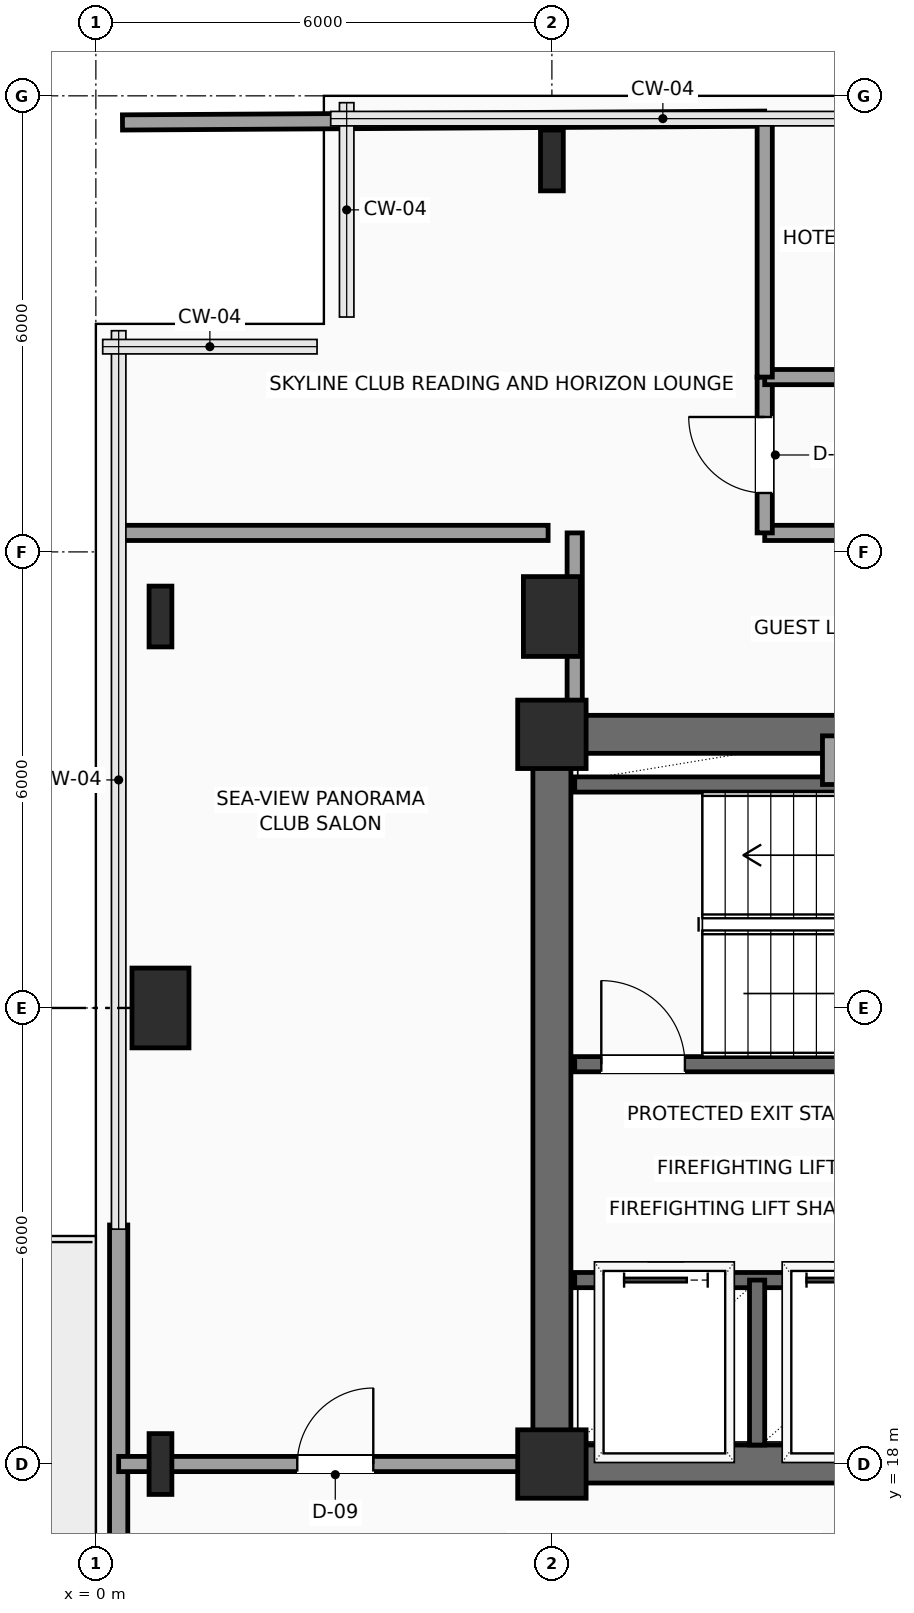
"""IFC4 building model, lengths in metres.
Left out: names, types, materials, properties, quantities, classifications, styles, units other than length and angle.
Written with IfcOpenShell. Run it as: python <this file> out.ifc"""

import sys

from ifc_helpers import new_model, si_unit, direction, frame, frame_2d, origin, origin_2d, place, context, subcontext, project, spatial, rectangle, i_section, extrude, element, fill, save


model = new_model("IFC4")
c1 = context("Model", 3, precision=1e-05, world=origin(), true_north=direction((0.0, 1.0)))
c2 = subcontext(c1, "Body", "Model", "MODEL_VIEW")
j1 = project(units=[si_unit("LENGTHUNIT", "METRE"), si_unit("PLANEANGLEUNIT", "RADIAN")], contexts=[c1])
p1 = place(None, origin())
s1 = spatial("IfcSite", under=j1, at=p1, CompositionType="ELEMENT")
p2 = place(p1, origin())
s2 = spatial("IfcBuilding", under=s1, at=p2, CompositionType="ELEMENT")
p3 = place(p2, frame((0.0, 0.0, 176.7)))
s3 = spatial("IfcBuildingStorey", under=s2, at=p3, CompositionType="ELEMENT", Elevation=176.7)
for number, where, z_axis, x_axis in (
    (1, (6.0, 18.0, 0.0), (0.0, 0.0, 1.0), (1.0, 0.0, 0.0)),
    (2, (6.0, 27.6, 0.0), (0.0, 0.0, 1.0), (1.0, 0.0, 0.0)),
):
    element("IfcColumn", number, at=place(p3, frame(where, z_axis=z_axis, x_axis=x_axis)), inside=s3, PredefinedType="COLUMN", context=c2, shape_type="SweptSolid", body=[
        extrude(rectangle(XDim=0.9, YDim=0.9, at=origin_2d()), origin(), (0.0, 0.0, 1.0), 3.75),
    ])
p4 = place(p3, frame((0.85, 18.0, 0.0), z_axis=(0.0, 0.0, 1.0), x_axis=(1.0, 0.0, 0.0)))
e3 = element("IfcColumn", 3, at=p4, inside=s3, PredefinedType="COLUMN", context=c2, shape_type="SweptSolid", body=[
    extrude(i_section(OverallWidth=0.3, OverallDepth=0.8, WebThickness=0.018, FlangeThickness=0.033, FilletRadius=0.03, at=origin_2d()), origin(), (0.0, 0.0, 1.0), 3.75),
])
p5 = place(p3, frame((0.85, 24.0, 0.0), z_axis=(0.0, 0.0, 1.0), x_axis=(1.0, 0.0, 0.0)))
e4 = element("IfcColumn", 4, at=p5, inside=s3, PredefinedType="COLUMN", context=c2, shape_type="SweptSolid", body=[
    extrude(rectangle(XDim=0.75, YDim=1.05, at=origin_2d()), origin(), (0.0, 0.0, 1.0), 3.75),
])
p6 = place(p3, frame((0.85, 29.15, 0.0), z_axis=(0.0, 0.0, 1.0), x_axis=(1.0, 0.0, 0.0)))
e5 = element("IfcColumn", 5, at=p6, inside=s3, PredefinedType="COLUMN", context=c2, shape_type="SweptSolid", body=[
    extrude(i_section(OverallWidth=0.3, OverallDepth=0.8, WebThickness=0.018, FlangeThickness=0.033, FilletRadius=0.03, at=origin_2d()), origin(), (0.0, 0.0, 1.0), 3.75),
])
p7 = place(p3, frame((6.0, 29.15, 0.0), z_axis=(0.0, 0.0, 1.0), x_axis=(1.0, 0.0, 0.0)))
e6 = element("IfcColumn", 6, at=p7, inside=s3, PredefinedType="COLUMN", context=c2, shape_type="SweptSolid", body=[
    extrude(rectangle(XDim=0.75, YDim=1.05, at=origin_2d()), origin(), (0.0, 0.0, 1.0), 3.75),
])
p8 = place(p3, frame((6.0, 35.15, 0.0), z_axis=(0.0, 0.0, 1.0), x_axis=(1.0, 0.0, 0.0)))
e7 = element("IfcColumn", 7, at=p8, inside=s3, PredefinedType="COLUMN", context=c2, shape_type="SweptSolid", body=[
    extrude(i_section(OverallWidth=0.3, OverallDepth=0.8, WebThickness=0.018, FlangeThickness=0.033, FilletRadius=0.03, at=origin_2d()), origin(), (0.0, 0.0, 1.0), 3.75),
])
p9 = place(p3, frame((0.3, 11.855, 0.0), z_axis=(0.0, 0.0, 1.0), x_axis=(0.0, 1.0, 0.0)))
e8 = element("IfcWall", 8, at=p9, inside=s3, PredefinedType="SOLIDWALL", context=c2, shape_type="SweptSolid", body=[
    extrude(rectangle(XDim=9.29, YDim=0.24, at=frame_2d((4.645, 0.0))), origin(), (0.0, 0.0, 1.0), 3.54),
])
p10 = place(p9, frame((2.7, 0.0, 0.0)))
e9 = element("IfcOpeningElement", 9, at=p10, cuts=e8, PredefinedType="OPENING", context=c2, shape_type="SweptSolid", body=[
    extrude(rectangle(XDim=1.05, YDim=2.2, at=frame_2d((0.525, 1.1))), frame((0.0, 0.13, 0.0), z_axis=(0.0, -1.0, 0.0), x_axis=(1.0, 0.0, 0.0)), (0.0, 0.0, 1.0), 0.26),
])
p11 = place(p3, frame((6.0, 18.0, 0.0), z_axis=(0.0, 0.0, 1.0), x_axis=(1.0, 0.0, 0.0)))
e10 = element("IfcWall", 10, at=p11, inside=s3, PredefinedType="SHEAR", context=c2, shape_type="SweptSolid", body=[
    extrude(rectangle(XDim=12.0, YDim=0.5, at=frame_2d((6.0, 0.0))), origin(), (0.0, 0.0, 1.0), 3.54),
])
p12 = place(p11, frame((7.15, 0.0, 0.0)))
e11 = element("IfcOpeningElement", 11, at=p12, cuts=e10, PredefinedType="OPENING", context=c2, shape_type="SweptSolid", body=[
    extrude(rectangle(XDim=1.6, YDim=2.3, at=frame_2d((0.8, 1.15))), frame((0.0, 0.26, 0.0), z_axis=(0.0, -1.0, 0.0), x_axis=(1.0, 0.0, 0.0)), (0.0, 0.0, 1.0), 0.52),
])
p13 = place(p3, frame((6.0, 27.6, 0.0), z_axis=(0.0, 0.0, 1.0), x_axis=(1.0, 0.0, 0.0)))
e12 = element("IfcWall", 12, at=p13, inside=s3, PredefinedType="SHEAR", context=c2, shape_type="SweptSolid", body=[
    extrude(rectangle(XDim=12.0, YDim=0.5, at=frame_2d((6.0, 0.0))), origin(), (0.0, 0.0, 1.0), 3.54),
])
p14 = place(p13, frame((10.2, 0.0, 0.0)))
e13 = element("IfcOpeningElement", 13, at=p14, cuts=e12, PredefinedType="OPENING", context=c2, shape_type="SweptSolid", body=[
    extrude(rectangle(XDim=0.9, YDim=2.15, at=frame_2d((0.45, 1.075))), frame((0.0, 0.26, 0.0), z_axis=(0.0, -1.0, 0.0), x_axis=(1.0, 0.0, 0.0)), (0.0, 0.0, 1.0), 0.52),
])
p15 = place(p3, frame((6.0, 18.0, 0.0), z_axis=(0.0, 0.0, 1.0), x_axis=(0.0, 1.0, 0.0)))
e14 = element("IfcWall", 14, at=p15, inside=s3, PredefinedType="SHEAR", context=c2, shape_type="SweptSolid", body=[
    extrude(rectangle(XDim=9.6, YDim=0.5, at=frame_2d((4.8, 0.0))), origin(), (0.0, 0.0, 1.0), 3.54),
])
p16 = place(p3, frame((6.3, 23.26, 0.0), z_axis=(0.0, 0.0, 1.0), x_axis=(1.0, 0.0, 0.0)))
e15 = element("IfcWall", 15, at=p16, inside=s3, PredefinedType="SHEAR", context=c2, shape_type="SweptSolid", body=[
    extrude(rectangle(XDim=8.88, YDim=0.2, at=frame_2d((4.44, 0.0))), origin(), (0.0, 0.0, 1.0), 3.54),
])
p17 = place(p16, frame((0.35, 0.0, 0.0)))
e16 = element("IfcOpeningElement", 16, at=p17, cuts=e15, PredefinedType="OPENING", context=c2, shape_type="SweptSolid", body=[
    extrude(rectangle(XDim=1.1, YDim=2.2, at=frame_2d((0.55, 1.1))), frame((0.0, 0.11, 0.0), z_axis=(0.0, -1.0, 0.0), x_axis=(1.0, 0.0, 0.0)), (0.0, 0.0, 1.0), 0.22),
])
p18 = place(p3, frame((6.3, 26.94, 0.0), z_axis=(0.0, 0.0, 1.0), x_axis=(1.0, 0.0, 0.0)))
e17 = element("IfcWall", 17, at=p18, inside=s3, PredefinedType="SHEAR", context=c2, shape_type="SweptSolid", body=[
    extrude(rectangle(XDim=8.88, YDim=0.2, at=frame_2d((4.44, 0.0))), origin(), (0.0, 0.0, 1.0), 3.54),
])
p19 = place(p3, frame((6.3, 20.42, 0.0), z_axis=(0.0, 0.0, 1.0), x_axis=(1.0, 0.0, 0.0)))
e18 = element("IfcWall", 18, at=p19, inside=s3, PredefinedType="SHEAR", context=c2, shape_type="SweptSolid", body=[
    extrude(rectangle(XDim=4.95, YDim=0.2, at=frame_2d((2.475, 0.0))), origin(), (0.0, 0.0, 1.0), 3.54),
])
p20 = place(p19, frame((0.65, 0.0, 0.0)))
e19 = element("IfcOpeningElement", 19, at=p20, cuts=e18, PredefinedType="OPENING", context=c2, shape_type="SweptSolid", body=[
    extrude(rectangle(XDim=1.1, YDim=2.2, at=frame_2d((0.55, 1.1))), frame((0.0, 0.11, 0.0), z_axis=(0.0, -1.0, 0.0), x_axis=(1.0, 0.0, 0.0)), (0.0, 0.0, 1.0), 0.22),
])
p21 = place(p19, frame((3.05, 0.0, 0.0)))
e20 = element("IfcOpeningElement", 20, at=p21, cuts=e18, PredefinedType="OPENING", context=c2, shape_type="SweptSolid", body=[
    extrude(rectangle(XDim=1.1, YDim=2.2, at=frame_2d((0.55, 1.1))), frame((0.0, 0.11, 0.0), z_axis=(0.0, -1.0, 0.0), x_axis=(1.0, 0.0, 0.0)), (0.0, 0.0, 1.0), 0.22),
])
p22 = place(p3, frame((8.7, 18.25, 0.0), z_axis=(0.0, 0.0, 1.0), x_axis=(0.0, 1.0, 0.0)))
e21 = element("IfcWall", 21, at=p22, inside=s3, PredefinedType="SHEAR", context=c2, shape_type="SweptSolid", body=[
    extrude(rectangle(XDim=2.17, YDim=0.2, at=frame_2d((1.085, 0.0))), origin(), (0.0, 0.0, 1.0), 3.54),
])
p23 = place(p3, frame((9.66, 26.94, 0.0), z_axis=(0.0, 0.0, 1.0), x_axis=(0.0, 1.0, 0.0)))
e22 = element("IfcWall", 22, at=p23, inside=s3, PredefinedType="SOLIDWALL", context=c2, shape_type="SweptSolid", body=[
    extrude(rectangle(XDim=0.64, YDim=0.2, at=frame_2d((0.32, 0.0))), origin(), (0.0, 0.0, 1.0), 3.54),
])
p24 = place(p3, frame((15.88, 30.25, 0.0), z_axis=(0.0, 0.0, 1.0), x_axis=(-1.0, 0.0, 0.0)))
e23 = element("IfcWall", 23, at=p24, inside=s3, PredefinedType="PARTITIONING", context=c2, shape_type="SweptSolid", body=[
    extrude(rectangle(XDim=7.08, YDim=0.2, at=frame_2d((3.54, 0.0))), origin(), (0.0, 0.0, 1.0), 3.54),
])
p25 = place(p24, frame((2.21, 0.0, 0.0)))
e24 = element("IfcOpeningElement", 24, at=p25, cuts=e23, PredefinedType="OPENING", context=c2, shape_type="SweptSolid", body=[
    extrude(rectangle(XDim=1.0, YDim=2.2, at=frame_2d((0.5, 1.1))), frame((0.0, 0.11, 0.0), z_axis=(0.0, -1.0, 0.0), x_axis=(1.0, 0.0, 0.0)), (0.0, 0.0, 1.0), 0.22),
])
p26 = place(p3, frame((8.8, 30.25, 0.0), z_axis=(0.0, 0.0, 1.0), x_axis=(0.0, 1.0, 0.0)))
e25 = element("IfcWall", 25, at=p26, inside=s3, PredefinedType="PARTITIONING", context=c2, shape_type="SweptSolid", body=[
    extrude(rectangle(XDim=2.05, YDim=0.2, at=frame_2d((1.025, 0.0))), origin(), (0.0, 0.0, 1.0), 3.54),
])
p27 = place(p26, frame((0.525, 0.0, 0.0)))
e26 = element("IfcOpeningElement", 26, at=p27, cuts=e25, PredefinedType="OPENING", context=c2, shape_type="SweptSolid", body=[
    extrude(rectangle(XDim=1.0, YDim=2.2, at=frame_2d((0.5, 1.1))), frame((0.0, 0.11, 0.0), z_axis=(0.0, -1.0, 0.0), x_axis=(1.0, 0.0, 0.0)), (0.0, 0.0, 1.0), 0.22),
])
p28 = place(p3, frame((8.8, 32.3, 0.0), z_axis=(0.0, 0.0, 1.0), x_axis=(1.0, 0.0, 0.0)))
e27 = element("IfcWall", 27, at=p28, inside=s3, PredefinedType="PARTITIONING", context=c2, shape_type="SweptSolid", body=[
    extrude(rectangle(XDim=6.2, YDim=0.2, at=frame_2d((3.1, 0.0))), origin(), (0.0, 0.0, 1.0), 3.132),
])
p29 = place(p28, frame((2.6, 0.0, 0.0)))
e28 = element("IfcOpeningElement", 28, at=p29, cuts=e27, PredefinedType="OPENING", context=c2, shape_type="SweptSolid", body=[
    extrude(rectangle(XDim=1.0, YDim=2.2, at=frame_2d((0.5, 1.1))), frame((0.0, 0.11, 0.0), z_axis=(0.0, -1.0, 0.0), x_axis=(1.0, 0.0, 0.0)), (0.0, 0.0, 1.0), 0.22),
])
p30 = place(p3, frame((0.3, 18.0, 0.0), z_axis=(0.0, 0.0, 1.0), x_axis=(1.0, 0.0, 0.0)))
e29 = element("IfcWall", 29, at=p30, inside=s3, PredefinedType="PARTITIONING", context=c2, shape_type="SweptSolid", body=[
    extrude(rectangle(XDim=5.65, YDim=0.2, at=frame_2d((2.825, 0.0))), origin(), (0.0, 0.0, 1.0), 3.132),
])
p31 = place(p30, frame((2.35, 0.0, 0.0)))
e30 = element("IfcOpeningElement", 30, at=p31, cuts=e29, PredefinedType="OPENING", context=c2, shape_type="SweptSolid", body=[
    extrude(rectangle(XDim=1.0, YDim=2.2, at=frame_2d((0.5, 1.1))), frame((0.0, 0.11, 0.0), z_axis=(0.0, -1.0, 0.0), x_axis=(1.0, 0.0, 0.0)), (0.0, 0.0, 1.0), 0.22),
])
p32 = place(p3, frame((0.3, 30.25, 0.0), z_axis=(0.0, 0.0, 1.0), x_axis=(1.0, 0.0, 0.0)))
e31 = element("IfcWall", 31, at=p32, inside=s3, PredefinedType="PARTITIONING", context=c2, shape_type="SweptSolid", body=[
    extrude(rectangle(XDim=5.65, YDim=0.2, at=frame_2d((2.825, 0.0))), origin(), (0.0, 0.0, 1.0), 3.54),
])
p33 = place(p3, frame((6.3, 27.65, 0.0), z_axis=(0.0, 0.0, 1.0), x_axis=(0.0, 1.0, 0.0)))
e32 = element("IfcWall", 32, at=p33, inside=s3, PredefinedType="PARTITIONING", context=c2, shape_type="SweptSolid", body=[
    extrude(rectangle(XDim=2.6, YDim=0.2, at=frame_2d((1.3, 0.0))), origin(), (0.0, 0.0, 1.0), 3.132),
])
p34 = place(p3, frame((0.35, 35.65, 0.0), z_axis=(0.0, 0.0, 1.0), x_axis=(0.99998245966, 0.005922868574, 0.0)))
e33 = element("IfcWall", 33, at=p34, inside=s3, PredefinedType="PARTITIONING", context=c2, shape_type="SweptSolid", body=[
    extrude(rectangle(XDim=8.45, YDim=0.2, at=frame_2d((4.225, 0.0))), origin(), (0.0, 0.0, 1.0), 3.54),
])
p35 = place(p3, frame((8.8, 32.3, 0.0), z_axis=(0.0, 0.0, 1.0), x_axis=(0.0, 1.0, 0.0)))
e34 = element("IfcWall", 34, at=p35, inside=s3, PredefinedType="PARTITIONING", context=c2, shape_type="SweptSolid", body=[
    extrude(rectangle(XDim=3.4, YDim=0.2, at=frame_2d((1.7, 0.0))), origin(), (0.0, 0.0, 1.0), 3.54),
])
p36 = place(p17, origin())
e35 = element("IfcDoor", 35, at=p36, inside=s3, OperationType="SINGLE_SWING_LEFT", PredefinedType="DOOR", context=c2, shape_type="SweptSolid", body=[
    extrude(rectangle(XDim=1.1, YDim=2.2, at=frame_2d((0.55, 1.1))), frame((0.0, 0.025, 0.0), z_axis=(0.0, -1.0, 0.0), x_axis=(1.0, 0.0, 0.0)), (0.0, 0.0, 1.0), 0.05),
])
fill(e16, e35)
p37 = place(p20, origin())
e36 = element("IfcDoor", 36, at=p37, inside=s3, OperationType="SLIDING_TO_LEFT", PredefinedType="DOOR", context=c2, shape_type="SweptSolid", body=[
    extrude(rectangle(XDim=1.1, YDim=2.2, at=frame_2d((0.55, 1.1))), frame((0.0, 0.025, 0.0), z_axis=(0.0, -1.0, 0.0), x_axis=(1.0, 0.0, 0.0)), (0.0, 0.0, 1.0), 0.05),
])
fill(e19, e36)
p38 = place(p21, origin())
e37 = element("IfcDoor", 37, at=p38, inside=s3, OperationType="SLIDING_TO_LEFT", PredefinedType="DOOR", context=c2, shape_type="SweptSolid", body=[
    extrude(rectangle(XDim=1.1, YDim=2.2, at=frame_2d((0.55, 1.1))), frame((0.0, 0.025, 0.0), z_axis=(0.0, -1.0, 0.0), x_axis=(1.0, 0.0, 0.0)), (0.0, 0.0, 1.0), 0.05),
])
fill(e20, e37)
p39 = place(p27, origin())
e38 = element("IfcDoor", 38, at=p39, inside=s3, OperationType="SINGLE_SWING_RIGHT", PredefinedType="DOOR", context=c2, shape_type="SweptSolid", body=[
    extrude(rectangle(XDim=1.0, YDim=2.2, at=frame_2d((0.5, 1.1))), frame((0.0, 0.025, 0.0), z_axis=(0.0, -1.0, 0.0), x_axis=(1.0, 0.0, 0.0)), (0.0, 0.0, 1.0), 0.05),
])
fill(e26, e38)
p40 = place(p31, origin())
e39 = element("IfcDoor", 39, at=p40, inside=s3, OperationType="SINGLE_SWING_RIGHT", PredefinedType="DOOR", context=c2, shape_type="SweptSolid", body=[
    extrude(rectangle(XDim=1.0, YDim=2.2, at=frame_2d((0.5, 1.1))), frame((0.0, 0.025, 0.0), z_axis=(0.0, -1.0, 0.0), x_axis=(1.0, 0.0, 0.0)), (0.0, 0.0, 1.0), 0.05),
])
fill(e30, e39)
save(model, sys.argv[1])
